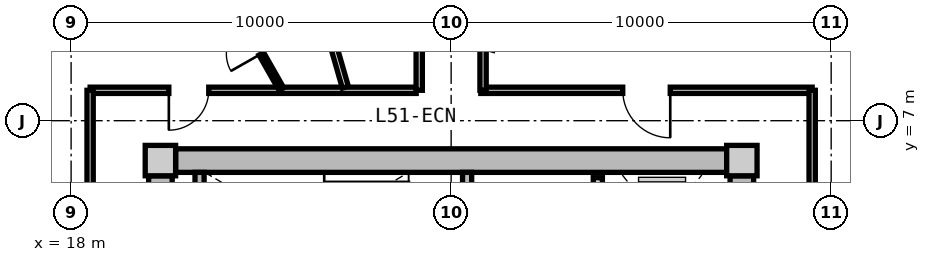
"""IFC4 building model, lengths in metres.
Left out: names, types, materials, properties, quantities, classifications, styles, units other than length and angle.
Written with IfcOpenShell. Run it as: python <this file> out.ifc"""

import sys

from ifc_helpers import new_model, si_unit, direction, frame, frame_2d, origin, origin_2d, place, context, subcontext, project, spatial, rectangle, extrude, source, transform, mapped, element, fill, save


model = new_model("IFC4")
c1 = context("Model", 3, precision=1e-05, world=origin(), true_north=direction((0.0, 1.0)))
c2 = subcontext(c1, "Body", "Model", "MODEL_VIEW")
j1 = project(units=[si_unit("LENGTHUNIT", "METRE"), si_unit("PLANEANGLEUNIT", "RADIAN")], contexts=[c1])
p1 = place(None, origin())
s1 = spatial("IfcSite", under=j1, at=p1, CompositionType="ELEMENT")
p2 = place(p1, origin())
s2 = spatial("IfcBuilding", under=s1, at=p2, CompositionType="ELEMENT")
p3 = place(p2, frame((0.0, 0.0, 164.8)))
s3 = spatial("IfcBuildingStorey", under=s2, at=p3, CompositionType="ELEMENT", Elevation=164.8)
m1 = source(origin(), c2, "Body", "SweptSolid", [
    extrude(rectangle(XDim=0.8, YDim=0.8, at=origin_2d()), origin(), (0.0, 0.0, 1.0), 3.05),
])
for number, where, z_axis, x_axis in (
    (1, (35.65, 5.95, 0.0), (0.0, 0.0, 1.0), (1.0, 0.0, 0.0)),
    (2, (20.35, 5.95, 0.0), (0.0, 0.0, 1.0), (1.0, 0.0, 0.0)),
):
    element("IfcColumn", number, at=place(p3, frame(where, z_axis=z_axis, x_axis=x_axis)), inside=s3, PredefinedType="COLUMN", context=c2, shape_type="MappedRepresentation", body=[
        mapped(m1, transform((0.0, 0.0, 0.0), x_axis=(1.0, 0.0, 0.0), y_axis=(0.0, 1.0, 0.0), z_axis=(0.0, 0.0, 1.0), scale=1.0)),
    ])
m2 = source(origin(), c2, "Body", "SweptSolid", [
    extrude(rectangle(XDim=14.5, YDim=0.62, at=frame_2d((7.25, 0.0))), origin(), (0.0, 0.0, 1.0), 2.81),
])
p4 = place(p3, frame((20.75, 5.95, 0.0), z_axis=(0.0, 0.0, 1.0), x_axis=(1.0, 0.0, 0.0)))
e3 = element("IfcWall", 3, at=p4, inside=s3, PredefinedType="SHEAR", context=c2, shape_type="MappedRepresentation", body=[
    mapped(m2, transform((0.0, 0.0, 0.0), x_axis=(1.0, 0.0, 0.0), y_axis=(0.0, 1.0, 0.0), z_axis=(0.0, 0.0, 1.0), scale=1.0)),
])
m3 = source(origin(), c2, "Body", "SweptSolid", [
    extrude(rectangle(XDim=11.1, YDim=0.62, at=frame_2d((5.55, 0.0))), origin(), (0.0, 0.0, 1.0), 2.81),
])
p5 = place(p3, frame((20.35, -5.55, 0.0), z_axis=(0.0, 0.0, 1.0), x_axis=(0.0, 1.0, 0.0)))
e4 = element("IfcWall", 4, at=p5, inside=s3, PredefinedType="SHEAR", context=c2, shape_type="MappedRepresentation", body=[
    mapped(m3, transform((0.0, 0.0, 0.0), x_axis=(1.0, 0.0, 0.0), y_axis=(0.0, 1.0, 0.0), z_axis=(0.0, 0.0, 1.0), scale=1.0)),
])
p6 = place(p5, frame((3.8, 0.0, 0.0)))
e5 = element("IfcOpeningElement", 5, at=p6, cuts=e4, PredefinedType="OPENING", context=c2, shape_type="SweptSolid", body=[
    extrude(rectangle(XDim=1.2, YDim=2.15, at=frame_2d((0.6, 1.075))), frame((0.0, 0.32, 0.0), z_axis=(0.0, -1.0, 0.0), x_axis=(1.0, 0.0, 0.0)), (0.0, 0.0, 1.0), 0.64),
])
p7 = place(p3, frame((35.65, 5.55, 0.0), z_axis=(0.0, 0.0, 1.0), x_axis=(0.0, -1.0, 0.0)))
e6 = element("IfcWall", 6, at=p7, inside=s3, PredefinedType="SHEAR", context=c2, shape_type="MappedRepresentation", body=[
    mapped(m3, transform((0.0, 0.0, 0.0), x_axis=(1.0, 0.0, 0.0), y_axis=(0.0, 1.0, 0.0), z_axis=(0.0, 0.0, 1.0), scale=1.0)),
])
p8 = place(p7, frame((5.65, 0.0, 0.0)))
e7 = element("IfcOpeningElement", 7, at=p8, cuts=e6, PredefinedType="OPENING", context=c2, shape_type="SweptSolid", body=[
    extrude(rectangle(XDim=1.2, YDim=2.15, at=frame_2d((0.6, 1.075))), frame((0.0, 0.32, 0.0), z_axis=(0.0, -1.0, 0.0), x_axis=(1.0, 0.0, 0.0)), (0.0, 0.0, 1.0), 0.64),
])
m4 = source(origin(), c2, "Body", "SweptSolid", [
    extrude(rectangle(XDim=3.19, YDim=0.24, at=frame_2d((1.595, 0.0))), origin(), (0.0, 0.0, 1.0), 2.81),
])
p9 = place(p3, frame((21.38, 2.45, 0.0), z_axis=(0.0, 0.0, 1.0), x_axis=(0.0, 1.0, 0.0)))
e8 = element("IfcWall", 8, at=p9, inside=s3, PredefinedType="PARTITIONING", context=c2, shape_type="MappedRepresentation", body=[
    mapped(m4, transform((0.0, 0.0, 0.0), x_axis=(1.0, 0.0, 0.0), y_axis=(0.0, 1.0, 0.0), z_axis=(0.0, 0.0, 1.0), scale=1.0)),
])
p10 = place(p3, frame((28.42, 2.45, 0.0), z_axis=(0.0, 0.0, 1.0), x_axis=(0.0, 1.0, 0.0)))
e9 = element("IfcWall", 9, at=p10, inside=s3, PredefinedType="PARTITIONING", context=c2, shape_type="MappedRepresentation", body=[
    mapped(m4, transform((0.0, 0.0, 0.0), x_axis=(1.0, 0.0, 0.0), y_axis=(0.0, 1.0, 0.0), z_axis=(0.0, 0.0, 1.0), scale=1.0)),
])
p11 = place(p10, frame((0.55, 0.0, 0.0)))
e10 = element("IfcOpeningElement", 10, at=p11, cuts=e9, PredefinedType="OPENING", context=c2, shape_type="SweptSolid", body=[
    extrude(rectangle(XDim=1.1, YDim=2.15, at=frame_2d((0.55, 1.075))), frame((0.0, 0.13, 0.0), z_axis=(0.0, -1.0, 0.0), x_axis=(1.0, 0.0, 0.0)), (0.0, 0.0, 1.0), 0.26),
])
m5 = source(origin(), c2, "Body", "SweptSolid", [
    extrude(rectangle(XDim=5.0, YDim=0.24, at=frame_2d((2.5, 0.0))), origin(), (0.0, 0.0, 1.0), 2.795),
])
p12 = place(p3, frame((31.86, 0.5, 0.0), z_axis=(0.0, 0.0, 1.0), x_axis=(0.0, 1.0, 0.0)))
e11 = element("IfcWall", 11, at=p12, inside=s3, PredefinedType="PARTITIONING", context=c2, shape_type="MappedRepresentation", body=[
    mapped(m5, transform((0.0, 0.0, 0.0), x_axis=(1.0, 0.0, 0.0), y_axis=(0.0, 1.0, 0.0), z_axis=(0.0, 0.0, 1.0), scale=1.0)),
])
p13 = place(p12, frame((3.05, 0.0, 0.0)))
e12 = element("IfcOpeningElement", 12, at=p13, cuts=e11, PredefinedType="OPENING", context=c2, shape_type="SweptSolid", body=[
    extrude(rectangle(XDim=1.3, YDim=2.2, at=frame_2d((0.65, 1.1))), frame((0.0, 0.13, 0.0), z_axis=(0.0, -1.0, 0.0), x_axis=(1.0, 0.0, 0.0)), (0.0, 0.0, 1.0), 0.26),
])
p14 = place(p12, frame((0.55, 0.0, 0.0)))
e13 = element("IfcOpeningElement", 13, at=p14, cuts=e11, PredefinedType="OPENING", context=c2, shape_type="SweptSolid", body=[
    extrude(rectangle(XDim=1.3, YDim=2.2, at=frame_2d((0.65, 1.1))), frame((0.0, 0.13, 0.0), z_axis=(0.0, -1.0, 0.0), x_axis=(1.0, 0.0, 0.0)), (0.0, 0.0, 1.0), 0.26),
])
m6 = source(origin(), c2, "Body", "SweptSolid", [
    extrude(rectangle(XDim=8.58, YDim=0.165, at=frame_2d((4.29, 0.0))), origin(), (0.0, 0.0, 1.0), 2.795),
])
p15 = place(p3, frame((18.5, 7.8, 0.0), z_axis=(0.0, 0.0, 1.0), x_axis=(1.0, 0.0, 0.0)))
e14 = element("IfcWall", 14, at=p15, inside=s3, PredefinedType="PARTITIONING", context=c2, shape_type="MappedRepresentation", body=[
    mapped(m6, transform((0.0, 0.0, 0.0), x_axis=(1.0, 0.0, 0.0), y_axis=(0.0, 1.0, 0.0), z_axis=(0.0, 0.0, 1.0), scale=1.0)),
])
p16 = place(p15, frame((2.072, 0.0, 0.0)))
e15 = element("IfcOpeningElement", 15, at=p16, cuts=e14, PredefinedType="OPENING", context=c2, shape_type="SweptSolid", body=[
    extrude(rectangle(XDim=1.05, YDim=2.15, at=frame_2d((0.525, 1.075))), frame((0.0, 0.093, 0.0), z_axis=(0.0, -1.0, 0.0), x_axis=(1.0, 0.0, 0.0)), (0.0, 0.0, 1.0), 0.185),
])
m7 = source(origin(), c2, "Body", "SweptSolid", [
    extrude(rectangle(XDim=8.719, YDim=0.165, at=frame_2d((4.36, 0.0))), origin(), (0.0, 0.0, 1.0), 2.795),
])
p17 = place(p3, frame((28.781, 7.8, 0.0), z_axis=(0.0, 0.0, 1.0), x_axis=(1.0, 0.0, 0.0)))
e16 = element("IfcWall", 16, at=p17, inside=s3, PredefinedType="PARTITIONING", context=c2, shape_type="MappedRepresentation", body=[
    mapped(m7, transform((0.0, 0.0, 0.0), x_axis=(1.0, 0.0, 0.0), y_axis=(0.0, 1.0, 0.0), z_axis=(0.0, 0.0, 1.0), scale=1.0)),
])
p18 = place(p17, frame((3.735, 0.0, 0.0)))
e17 = element("IfcOpeningElement", 17, at=p18, cuts=e16, PredefinedType="OPENING", context=c2, shape_type="SweptSolid", body=[
    extrude(rectangle(XDim=1.25, YDim=2.2, at=frame_2d((0.625, 1.1))), frame((0.0, 0.093, 0.0), z_axis=(0.0, -1.0, 0.0), x_axis=(1.0, 0.0, 0.0)), (0.0, 0.0, 1.0), 0.185),
])
m8 = source(origin(), c2, "Body", "SweptSolid", [
    extrude(rectangle(XDim=6.88, YDim=0.165, at=frame_2d((3.44, 0.0))), origin(), (0.0, 0.0, 1.0), 2.795),
])
for number, where, z_axis, x_axis in (
    (18, (18.5, 0.92, 0.0), (0.0, 0.0, 1.0), (0.0, 1.0, 0.0)),
    (19, (37.5, 7.8, 0.0), (0.0, 0.0, 1.0), (0.0, -1.0, 0.0)),
):
    element("IfcWall", number, at=place(p3, frame(where, z_axis=z_axis, x_axis=x_axis)), inside=s3, PredefinedType="PARTITIONING", context=c2, shape_type="MappedRepresentation", body=[
        mapped(m8, transform((0.0, 0.0, 0.0), x_axis=(1.0, 0.0, 0.0), y_axis=(0.0, 1.0, 0.0), z_axis=(0.0, 0.0, 1.0), scale=1.0)),
    ])
m9 = source(origin(), c2, "Body", "SweptSolid", [
    extrude(rectangle(XDim=9.73, YDim=0.165, at=frame_2d((4.865, 0.0))), origin(), (0.0, 0.0, 1.0), 2.345),
])
p19 = place(p3, frame((25.217, 7.88, 0.0), z_axis=(0.0, 0.0, 1.0), x_axis=(-0.27679492614, 0.960929013436, 0.0)))
e20 = element("IfcWall", 20, at=p19, inside=s3, PredefinedType="PARTITIONING", context=c2, shape_type="MappedRepresentation", body=[
    mapped(m9, transform((0.0, 0.0, 0.0), x_axis=(1.0, 0.0, 0.0), y_axis=(0.0, 1.0, 0.0), z_axis=(0.0, 0.0, 1.0), scale=1.0)),
])
m10 = source(origin(), c2, "Body", "SweptSolid", [
    extrude(rectangle(XDim=8.305, YDim=0.165, at=frame_2d((4.153, 0.0))), origin(), (0.0, 0.0, 1.0), 2.345),
])
p20 = place(p3, frame((18.42, 3.908, 0.0), z_axis=(0.0, 0.0, 1.0), x_axis=(-0.970309994378, 0.241864662175, 0.0)))
e21 = element("IfcWall", 21, at=p20, inside=s3, PredefinedType="PARTITIONING", context=c2, shape_type="MappedRepresentation", body=[
    mapped(m10, transform((0.0, 0.0, 0.0), x_axis=(1.0, 0.0, 0.0), y_axis=(0.0, 1.0, 0.0), z_axis=(0.0, 0.0, 1.0), scale=1.0)),
])
m11 = source(origin(), c2, "Body", "SweptSolid", [
    extrude(rectangle(XDim=6.193, YDim=0.165, at=frame_2d((3.096, 0.0))), origin(), (0.0, 0.0, 1.0), 2.345),
])
p21 = place(p3, frame((37.58, 4.419, 0.0), z_axis=(0.0, 0.0, 1.0), x_axis=(0.970309243466, 0.241867674657, 0.0)))
e22 = element("IfcWall", 22, at=p21, inside=s3, PredefinedType="PARTITIONING", context=c2, shape_type="MappedRepresentation", body=[
    mapped(m11, transform((0.0, 0.0, 0.0), x_axis=(1.0, 0.0, 0.0), y_axis=(0.0, 1.0, 0.0), z_axis=(0.0, 0.0, 1.0), scale=1.0)),
])
m12 = source(origin(), c2, "Body", "SweptSolid", [
    extrude(rectangle(XDim=9.48, YDim=0.165, at=frame_2d((4.74, 0.0))), origin(), (0.0, 0.0, 1.0), 2.795),
])
p22 = place(p3, frame((27.16, 7.8, 0.0), z_axis=(0.0, 0.0, 1.0), x_axis=(0.0, 1.0, 0.0)))
e23 = element("IfcWall", 23, at=p22, inside=s3, PredefinedType="PARTITIONING", context=c2, shape_type="MappedRepresentation", body=[
    mapped(m12, transform((0.0, 0.0, 0.0), x_axis=(1.0, 0.0, 0.0), y_axis=(0.0, 1.0, 0.0), z_axis=(0.0, 0.0, 1.0), scale=1.0)),
])
p23 = place(p22, frame((4.265, 0.0, 0.0)))
e24 = element("IfcOpeningElement", 24, at=p23, cuts=e23, PredefinedType="OPENING", context=c2, shape_type="SweptSolid", body=[
    extrude(rectangle(XDim=0.95, YDim=2.1, at=frame_2d((0.475, 1.05))), frame((0.0, 0.093, 0.0), z_axis=(0.0, -1.0, 0.0), x_axis=(1.0, 0.0, 0.0)), (0.0, 0.0, 1.0), 0.185),
])
p24 = place(p3, frame((28.84, 17.28, 0.0), z_axis=(0.0, 0.0, 1.0), x_axis=(0.0, -1.0, 0.0)))
e25 = element("IfcWall", 25, at=p24, inside=s3, PredefinedType="PARTITIONING", context=c2, shape_type="MappedRepresentation", body=[
    mapped(m12, transform((0.0, 0.0, 0.0), x_axis=(1.0, 0.0, 0.0), y_axis=(0.0, 1.0, 0.0), z_axis=(0.0, 0.0, 1.0), scale=1.0)),
])
p25 = place(p24, frame((4.01, 0.0, 0.0)))
e26 = element("IfcOpeningElement", 26, at=p25, cuts=e25, PredefinedType="OPENING", context=c2, shape_type="SweptSolid", body=[
    extrude(rectangle(XDim=0.95, YDim=2.1, at=frame_2d((0.475, 1.05))), frame((0.0, 0.093, 0.0), z_axis=(0.0, -1.0, 0.0), x_axis=(1.0, 0.0, 0.0)), (0.0, 0.0, 1.0), 0.185),
])
m13 = source(origin(), c2, "Body", "SweptSolid", [
    extrude(rectangle(XDim=6.654, YDim=0.115, at=frame_2d((3.327, 0.0))), origin(), (0.0, 0.0, 1.0), 2.795),
])
p26 = place(p3, frame((17.509, 10.632, 0.0), z_axis=(0.0, 0.0, 1.0), x_axis=(-0.53923796816, -0.842153438332, 0.0)))
e27 = element("IfcWall", 27, at=p26, inside=s3, PredefinedType="PARTITIONING", context=c2, shape_type="MappedRepresentation", body=[
    mapped(m13, transform((0.0, 0.0, 0.0), x_axis=(1.0, 0.0, 0.0), y_axis=(0.0, 1.0, 0.0), z_axis=(0.0, 0.0, 1.0), scale=1.0)),
])
p27 = place(p26, frame((2.852, 0.0, 0.0)))
e28 = element("IfcOpeningElement", 28, at=p27, cuts=e27, PredefinedType="OPENING", context=c2, shape_type="SweptSolid", body=[
    extrude(rectangle(XDim=0.95, YDim=2.1, at=frame_2d((0.475, 1.05))), frame((0.0, 0.067, 0.0), z_axis=(0.0, -1.0, 0.0), x_axis=(1.0, 0.0, 0.0)), (0.0, 0.0, 1.0), 0.135),
])
m14 = source(origin(), c2, "Body", "SweptSolid", [
    extrude(rectangle(XDim=3.064, YDim=0.14, at=frame_2d((1.532, 0.0))), origin(), (0.0, 0.0, 1.0), 2.795),
])
p28 = place(p3, frame((23.534, 7.83, 0.0), z_axis=(0.0, 0.0, 1.0), x_axis=(-0.494103864861, 0.869402881712, 0.0)))
e29 = element("IfcWall", 29, at=p28, inside=s3, PredefinedType="PARTITIONING", context=c2, shape_type="MappedRepresentation", body=[
    mapped(m14, transform((0.0, 0.0, 0.0), x_axis=(1.0, 0.0, 0.0), y_axis=(0.0, 1.0, 0.0), z_axis=(0.0, 0.0, 1.0), scale=1.0)),
])
p29 = place(p28, frame((1.072, 0.0, 0.0)))
e30 = element("IfcOpeningElement", 30, at=p29, cuts=e29, PredefinedType="OPENING", context=c2, shape_type="SweptSolid", body=[
    extrude(rectangle(XDim=0.92, YDim=2.1, at=frame_2d((0.46, 1.05))), frame((0.0, 0.08, 0.0), z_axis=(0.0, -1.0, 0.0), x_axis=(1.0, 0.0, 0.0)), (0.0, 0.0, 1.0), 0.16),
])
m15 = source(origin(), c2, "Body", "SweptSolid", [
    extrude(rectangle(XDim=1.25, YDim=2.2, at=frame_2d((0.625, 1.1))), frame((0.0, 0.025, 0.0), z_axis=(0.0, -1.0, 0.0), x_axis=(1.0, 0.0, 0.0)), (0.0, 0.0, 1.0), 0.05),
])
p30 = place(p18, frame((1.25, 0.0, 0.0), z_axis=(0.0, 0.0, 1.0), x_axis=(-1.0, 0.0, 0.0)))
e31 = element("IfcDoor", 31, at=p30, inside=s3, OperationType="SINGLE_SWING_LEFT", PredefinedType="DOOR", context=c2, shape_type="MappedRepresentation", body=[
    mapped(m15, transform((0.0, 0.0, 0.0), x_axis=(1.0, 0.0, 0.0), y_axis=(0.0, 1.0, 0.0), z_axis=(0.0, 0.0, 1.0), scale=1.0)),
])
fill(e17, e31)
m16 = source(origin(), c2, "Body", "SweptSolid", [
    extrude(rectangle(XDim=1.05, YDim=2.15, at=frame_2d((0.525, 1.075))), frame((0.0, 0.025, 0.0), z_axis=(0.0, -1.0, 0.0), x_axis=(1.0, 0.0, 0.0)), (0.0, 0.0, 1.0), 0.05),
])
p31 = place(p16, frame((1.05, 0.0, 0.0), z_axis=(0.0, 0.0, 1.0), x_axis=(-1.0, 0.0, 0.0)))
e32 = element("IfcDoor", 32, at=p31, inside=s3, OperationType="SINGLE_SWING_RIGHT", PredefinedType="DOOR", context=c2, shape_type="MappedRepresentation", body=[
    mapped(m16, transform((0.0, 0.0, 0.0), x_axis=(1.0, 0.0, 0.0), y_axis=(0.0, 1.0, 0.0), z_axis=(0.0, 0.0, 1.0), scale=1.0)),
])
fill(e15, e32)
m17 = source(origin(), c2, "Body", "SweptSolid", [
    extrude(rectangle(XDim=0.92, YDim=2.1, at=frame_2d((0.46, 1.05))), frame((0.0, 0.025, 0.0), z_axis=(0.0, -1.0, 0.0), x_axis=(1.0, 0.0, 0.0)), (0.0, 0.0, 1.0), 0.05),
])
p32 = place(p29, origin())
e33 = element("IfcDoor", 33, at=p32, inside=s3, OperationType="SINGLE_SWING_LEFT", PredefinedType="DOOR", context=c2, shape_type="MappedRepresentation", body=[
    mapped(m17, transform((0.0, 0.0, 0.0), x_axis=(1.0, 0.0, 0.0), y_axis=(0.0, 1.0, 0.0), z_axis=(0.0, 0.0, 1.0), scale=1.0)),
])
fill(e30, e33)
save(model, sys.argv[1])
